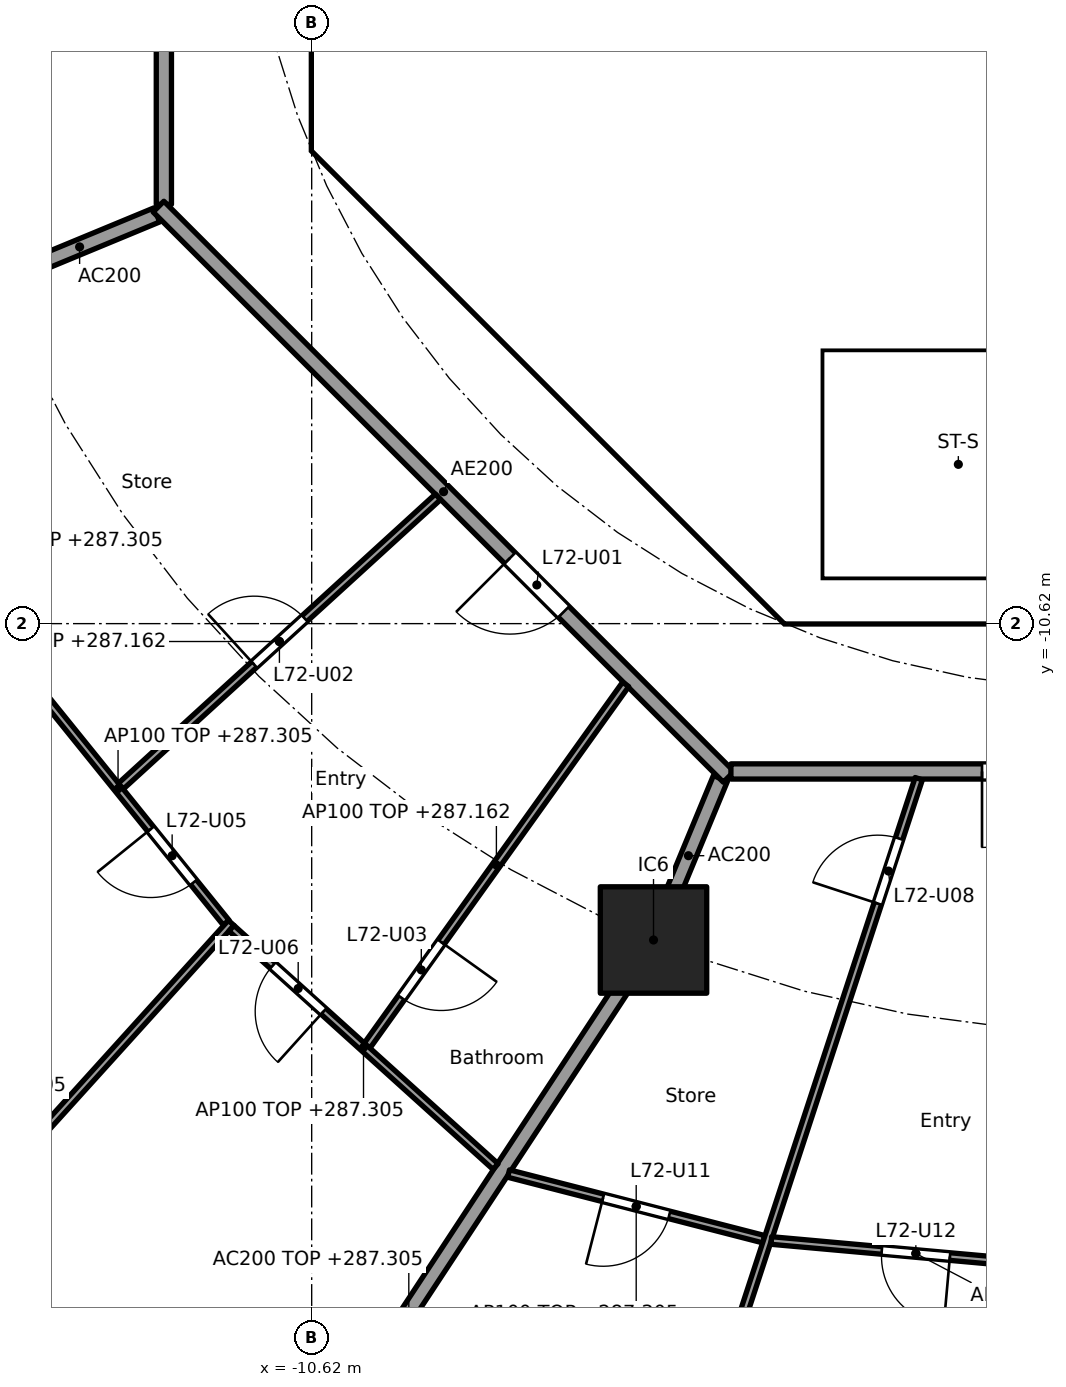
"""IFC4 building model, lengths in metres.
Left out: names, types, materials, properties, quantities, classifications, styles, units other than length and angle.
Written with IfcOpenShell. Run it as: python <this file> out.ifc"""

import sys

from ifc_helpers import new_model, si_unit, direction, frame, frame_2d, origin, origin_2d, place, context, subcontext, project, spatial, polyline, rectangle, outline, extrude, element, fill, save


model = new_model("IFC4")
c1 = context("Model", 3, precision=1e-05, world=origin(), true_north=direction((0.0, 1.0)))
c2 = subcontext(c1, "Body", "Model", "MODEL_VIEW")
j1 = project(units=[si_unit("LENGTHUNIT", "METRE"), si_unit("PLANEANGLEUNIT", "RADIAN")], contexts=[c1])
p1 = place(None, origin())
s1 = spatial("IfcSite", under=j1, at=p1, CompositionType="ELEMENT")
p2 = place(p1, origin())
s2 = spatial("IfcBuilding", under=s1, at=p2, CompositionType="ELEMENT")
p3 = place(p2, frame((0.0, 0.0, 284.4)))
s3 = spatial("IfcBuildingStorey", under=s2, at=p3, CompositionType="ELEMENT", Elevation=284.4)
p4 = place(p3, frame((-6.123, -14.782, 0.0), z_axis=(0.0, 0.0, 1.0), x_axis=(1.0, 0.0, 0.0)))
e1 = element("IfcColumn", 1, at=p4, inside=s3, PredefinedType="COLUMN", context=c2, shape_type="SweptSolid", body=[
    extrude(rectangle(XDim=1.4, YDim=1.4, at=origin_2d()), origin(), (0.0, 0.0, 1.0), 3.7),
])
p5 = place(p3, frame((-10.325, 3.801, 0.0), z_axis=(0.0, 0.0, 1.0), x_axis=(0.0, -1.0, 0.0)))
e2 = element("IfcWall", 2, at=p5, inside=s3, PredefinedType="SHEAR", context=c2, shape_type="SweptSolid", body=[
    extrude(rectangle(XDim=7.602, YDim=0.6, at=frame_2d((3.801, 0.0))), origin(), (0.0, 0.0, 1.0), 3.44),
])
p6 = place(p5, frame((0.651, 0.0, 0.0)))
e3 = element("IfcOpeningElement", 3, at=p6, cuts=e2, PredefinedType="OPENING", context=c2, shape_type="SweptSolid", body=[
    extrude(rectangle(XDim=1.5, YDim=2.1, at=frame_2d((0.75, 1.05))), frame((0.0, 0.31, 0.0), z_axis=(0.0, -1.0, 0.0), x_axis=(1.0, 0.0, 0.0)), (0.0, 0.0, 1.0), 0.62),
])
p7 = place(p5, frame((5.451, 0.0, 0.0)))
e4 = element("IfcOpeningElement", 4, at=p7, cuts=e2, PredefinedType="OPENING", context=c2, shape_type="SweptSolid", body=[
    extrude(rectangle(XDim=1.5, YDim=2.1, at=frame_2d((0.75, 1.05))), frame((0.0, 0.31, 0.0), z_axis=(0.0, -1.0, 0.0), x_axis=(1.0, 0.0, 0.0)), (0.0, 0.0, 1.0), 0.62),
])
p8 = place(p3, frame((-9.988, -4.613, 0.0), z_axis=(0.0, 0.0, 1.0), x_axis=(0.707106781187, -0.707106781187, 0.0)))
e5 = element("IfcWall", 5, at=p8, inside=s3, PredefinedType="SHEAR", context=c2, shape_type="SweptSolid", body=[
    extrude(rectangle(XDim=7.602, YDim=0.6, at=frame_2d((3.801, 0.0))), origin(), (0.0, 0.0, 1.0), 3.44),
])
p9 = place(p8, frame((6.151, 0.0, 0.0)))
e6 = element("IfcOpeningElement", 6, at=p9, cuts=e5, PredefinedType="OPENING", context=c2, shape_type="SweptSolid", body=[
    extrude(rectangle(XDim=1.1, YDim=2.1, at=frame_2d((0.55, 1.05))), frame((0.0, 0.31, 0.0), z_axis=(0.0, -1.0, 0.0), x_axis=(1.0, 0.0, 0.0)), (0.0, 0.0, 1.0), 0.62),
])
p10 = place(p3, frame((-6.2, -7.827, 0.0), z_axis=(0.0, 0.0, 1.0), x_axis=(0.0, 1.0, 0.0)))
e7 = element("IfcWall", 7, at=p10, inside=s3, PredefinedType="PARTITIONING", context=c2, shape_type="SweptSolid", body=[
    extrude(rectangle(XDim=3.527, YDim=0.15, at=frame_2d((1.763, 0.0))), origin(), (0.0, 0.0, 1.0), 3.44),
])
p11 = place(p10, frame((2.365, 0.0, 0.0)))
e8 = element("IfcOpeningElement", 8, at=p11, cuts=e7, PredefinedType="OPENING", context=c2, shape_type="SweptSolid", body=[
    extrude(rectangle(XDim=0.9, YDim=2.1, at=frame_2d((0.45, 1.05))), frame((0.0, 0.085, 0.0), z_axis=(0.0, -1.0, 0.0), x_axis=(1.0, 0.0, 0.0)), (0.0, 0.0, 1.0), 0.17),
])
p12 = place(p10, frame((0.489, 0.0, 0.0)))
e9 = element("IfcOpeningElement", 9, at=p12, cuts=e7, PredefinedType="OPENING", context=c2, shape_type="SweptSolid", body=[
    extrude(rectangle(XDim=0.9, YDim=2.1, at=frame_2d((0.45, 1.05))), frame((0.0, 0.085, 0.0), z_axis=(0.0, -1.0, 0.0), x_axis=(1.0, 0.0, 0.0)), (0.0, 0.0, 1.0), 0.17),
])
p13 = place(p3, frame((-4.0, -6.5, 0.0), z_axis=(0.0, 0.0, 1.0), x_axis=(0.0, 1.0, 0.0)))
e10 = element("IfcWall", 10, at=p13, inside=s3, PredefinedType="SOLIDWALL", context=c2, shape_type="SweptSolid", body=[
    extrude(rectangle(XDim=2.2, YDim=0.2, at=frame_2d((1.1, 0.0))), origin(), (0.0, 0.0, 1.0), 3.44),
])
p14 = place(p13, frame((0.65, 0.0, 0.0)))
e11 = element("IfcOpeningElement", 11, at=p14, cuts=e10, PredefinedType="OPENING", context=c2, shape_type="SweptSolid", body=[
    extrude(rectangle(XDim=0.9, YDim=2.1, at=frame_2d((0.45, 1.05))), frame((0.0, 0.11, 0.0), z_axis=(0.0, -1.0, 0.0), x_axis=(1.0, 0.0, 0.0)), (0.0, 0.0, 1.0), 0.22),
])
p15 = place(p3, origin())
e12 = element("IfcWall", 12, at=p15, inside=s3, PredefinedType="SHEAR", context=c2, shape_type="SweptSolid", body=[
    extrude(outline(polyline([(-10.625, -3.801), (-10.025, -3.801), (-10.025, -4.152), (-9.776, -4.401), (-10.2, -4.825), (-10.625, -4.401), (-10.625, -3.801)])), origin(), (0.0, 0.0, 1.0), 3.44),
])
p16 = place(p3, origin())
e13 = element("IfcWall", 13, at=p16, inside=s3, PredefinedType="SHEAR", context=c2, shape_type="SweptSolid", body=[
    extrude(outline(polyline([(-4.152, -10.025), (4.152, -10.025), (4.401, -9.776), (4.825, -10.2), (4.401, -10.625), (-4.401, -10.625), (-4.825, -10.2), (-4.401, -9.776), (-4.152, -10.025)])), origin(), (0.0, 0.0, 1.0), 3.44),
])
p17 = place(p3, frame((-10.025, -4.0, 0.0), z_axis=(0.0, 0.0, 1.0), x_axis=(1.0, 0.0, 0.0)))
e14 = element("IfcWall", 14, at=p17, inside=s3, PredefinedType="PARTITIONING", context=c2, shape_type="SweptSolid", body=[
    extrude(rectangle(XDim=3.325, YDim=0.2, at=frame_2d((1.662, 0.0))), origin(), (0.0, 0.0, 1.0), 3.44),
])
p18 = place(p3, frame((-8.301, -5.8, 0.0), z_axis=(0.0, 0.0, 1.0), x_axis=(1.0, 0.0, 0.0)))
e15 = element("IfcWall", 15, at=p18, inside=s3, PredefinedType="PARTITIONING", context=c2, shape_type="SweptSolid", body=[
    extrude(rectangle(XDim=2.026, YDim=0.15, at=frame_2d((1.013, 0.0))), origin(), (0.0, 0.0, 1.0), 3.44),
])
p19 = place(p3, origin())
e16 = element("IfcWall", 16, at=p19, inside=s3, PredefinedType="SOLIDWALL", context=c2, shape_type="SweptSolid", body=[
    extrude(outline(polyline([(-6.7, -2.1), (-6.5, -2.1), (-6.5, -4.1), (-2.3, -4.1), (-2.3, -2.1), (-2.1, -2.1), (-2.1, -4.1), (-0.1, -4.1), (-0.1, -2.1), (0.1, -2.1), (0.1, -4.1), (2.1, -4.1), (2.1, -2.1), (2.3, -2.1), (2.3, -4.1), (4.3, -4.1), (4.3, -2.1), (4.5, -2.1), (4.5, -4.1), (6.5, -4.1), (6.5, -2.1), (6.7, -2.1), (6.7, -4.3), (-6.7, -4.3), (-6.7, -2.1)])), origin(), (0.0, 0.0, 1.0), 3.44),
])
p20 = place(p3, origin())
e17 = element("IfcWall", 17, at=p20, inside=s3, PredefinedType="SOLIDWALL", context=c2, shape_type="SweptSolid", body=[
    extrude(outline(polyline([(-3.9, -10.025), (-4.1, -10.025), (-4.1, -7.025), (-3.9, -7.025), (-3.9, -10.025)])), origin(), (0.0, 0.0, 1.0), 3.44),
])
p21 = place(p3, origin())
e18 = element("IfcWall", 18, at=p21, inside=s3, PredefinedType="SOLIDWALL", context=c2, shape_type="SweptSolid", body=[
    extrude(outline(polyline([(4.1, -7.025), (-4.1, -7.025), (-4.1, -6.5), (4.1, -6.5), (4.1, -7.025)])), origin(), (0.0, 0.0, 1.0), 3.44),
])
p22 = place(p3, frame((-12.657, -5.243, 0.0), z_axis=(0.0, 0.0, 1.0), x_axis=(-0.923859888513, -0.38273085373, 0.0)))
e19 = element("IfcWall", 19, at=p22, inside=s3, PredefinedType="PARTITIONING", context=c2, shape_type="SweptSolid", body=[
    extrude(rectangle(XDim=2.199, YDim=0.2, at=frame_2d((1.1, 0.0))), origin(), (0.0, 0.0, 1.0), 3.44),
])
p23 = place(p3, frame((-5.243, -12.657, 0.0), z_axis=(0.0, 0.0, 1.0), x_axis=(-0.382770106157, -0.923843626288, 0.0)))
e20 = element("IfcWall", 20, at=p23, inside=s3, PredefinedType="PARTITIONING", context=c2, shape_type="SweptSolid", body=[
    extrude(rectangle(XDim=2.199, YDim=0.2, at=frame_2d((1.1, 0.0))), origin(), (0.0, 0.0, 1.0), 3.44),
])
p24 = place(p3, frame((-6.151, -14.824, 0.0), z_axis=(0.0, 0.0, 1.0), x_axis=(-0.549345577828, -0.835595258556, 0.0)))
e21 = element("IfcWall", 21, at=p24, inside=s3, PredefinedType="PARTITIONING", context=c2, shape_type="SweptSolid", body=[
    extrude(rectangle(XDim=11.62, YDim=0.2, at=frame_2d((5.81, 0.0))), origin(), (0.0, 0.0, 1.0), 2.905),
])
p25 = place(p3, frame((-12.565, 5.304, 0.0), z_axis=(0.0, 0.0, 1.0), x_axis=(0.0, -1.0, 0.0)))
e22 = element("IfcWall", 22, at=p25, inside=s3, PredefinedType="PARTITIONING", context=c2, shape_type="SweptSolid", body=[
    extrude(rectangle(XDim=10.409, YDim=0.2, at=frame_2d((5.205, 0.0))), origin(), (0.0, 0.0, 1.0), 3.44),
])
p26 = place(p25, frame((4.804, 0.0, 0.0)))
e23 = element("IfcOpeningElement", 23, at=p26, cuts=e22, PredefinedType="OPENING", context=c2, shape_type="SweptSolid", body=[
    extrude(rectangle(XDim=1.0, YDim=2.1, at=frame_2d((0.5, 1.05))), frame((0.0, 0.11, 0.0), z_axis=(0.0, -1.0, 0.0), x_axis=(1.0, 0.0, 0.0)), (0.0, 0.0, 1.0), 0.22),
])
p27 = place(p3, frame((-12.635, -5.134, 0.0), z_axis=(0.0, 0.0, 1.0), x_axis=(0.707106781187, -0.707106781187, 0.0)))
e24 = element("IfcWall", 24, at=p27, inside=s3, PredefinedType="PARTITIONING", context=c2, shape_type="SweptSolid", body=[
    extrude(rectangle(XDim=10.609, YDim=0.2, at=frame_2d((5.305, 0.0))), origin(), (0.0, 0.0, 1.0), 3.44),
])
p28 = place(p27, frame((6.539, 0.0, 0.0)))
e25 = element("IfcOpeningElement", 25, at=p28, cuts=e24, PredefinedType="OPENING", context=c2, shape_type="SweptSolid", body=[
    extrude(rectangle(XDim=1.0, YDim=2.1, at=frame_2d((0.5, 1.05))), frame((0.0, 0.11, 0.0), z_axis=(0.0, -1.0, 0.0), x_axis=(1.0, 0.0, 0.0)), (0.0, 0.0, 1.0), 0.22),
])
p29 = place(p3, frame((-5.104, -12.565, 0.0), z_axis=(0.0, 0.0, 1.0), x_axis=(1.0, 0.0, 0.0)))
e26 = element("IfcWall", 26, at=p29, inside=s3, PredefinedType="PARTITIONING", context=c2, shape_type="SweptSolid", body=[
    extrude(rectangle(XDim=10.409, YDim=0.2, at=frame_2d((5.205, 0.0))), origin(), (0.0, 0.0, 1.0), 3.44),
])
p30 = place(p29, frame((3.303, 0.0, 0.0)))
e27 = element("IfcOpeningElement", 27, at=p30, cuts=e26, PredefinedType="OPENING", context=c2, shape_type="SweptSolid", body=[
    extrude(rectangle(XDim=1.0, YDim=2.1, at=frame_2d((0.5, 1.05))), frame((0.0, 0.11, 0.0), z_axis=(0.0, -1.0, 0.0), x_axis=(1.0, 0.0, 0.0)), (0.0, 0.0, 1.0), 0.22),
])
p31 = place(p3, frame((-14.591, -11.029, 0.0), z_axis=(0.0, 0.0, 1.0), x_axis=(0.628170338674, -0.778075848237, 0.0)))
e28 = element("IfcWall", 28, at=p31, inside=s3, PredefinedType="PARTITIONING", context=c2, shape_type="SweptSolid", body=[
    extrude(rectangle(XDim=4.532, YDim=0.1, at=frame_2d((2.266, 0.0))), origin(), (0.0, 0.0, 1.0), 2.905),
])
p32 = place(p31, frame((2.949, 0.0, 0.0)))
e29 = element("IfcOpeningElement", 29, at=p32, cuts=e28, PredefinedType="OPENING", context=c2, shape_type="SweptSolid", body=[
    extrude(rectangle(XDim=0.9, YDim=2.1, at=frame_2d((0.45, 1.05))), frame((0.0, 0.06, 0.0), z_axis=(0.0, -1.0, 0.0), x_axis=(1.0, 0.0, 0.0)), (0.0, 0.0, 1.0), 0.12),
])
p33 = place(p3, frame((-8.958, -8.952, 0.0), z_axis=(0.0, 0.0, 1.0), x_axis=(-0.73876526954, -0.673962815385, 0.0)))
e30 = element("IfcWall", 30, at=p33, inside=s3, PredefinedType="PARTITIONING", context=c2, shape_type="SweptSolid", body=[
    extrude(rectangle(XDim=5.647, YDim=0.1, at=frame_2d((2.824, 0.0))), origin(), (0.0, 0.0, 1.0), 2.762),
])
p34 = place(p33, frame((2.374, 0.0, 0.0)))
e31 = element("IfcOpeningElement", 31, at=p34, cuts=e30, PredefinedType="OPENING", context=c2, shape_type="SweptSolid", body=[
    extrude(rectangle(XDim=0.9, YDim=2.1, at=frame_2d((0.45, 1.05))), frame((0.0, 0.06, 0.0), z_axis=(0.0, -1.0, 0.0), x_axis=(1.0, 0.0, 0.0)), (0.0, 0.0, 1.0), 0.12),
])
p35 = place(p3, frame((-11.679, -14.557, 0.0), z_axis=(0.0, 0.0, 1.0), x_axis=(-0.670800011545, -0.741638284146, 0.0)))
e32 = element("IfcWall", 32, at=p35, inside=s3, PredefinedType="PARTITIONING", context=c2, shape_type="SweptSolid", body=[
    extrude(rectangle(XDim=8.068, YDim=0.1, at=frame_2d((4.034, 0.0))), origin(), (0.0, 0.0, 1.0), 2.905),
])
p36 = place(p3, frame((-11.676, -14.628, 0.0), z_axis=(0.0, 0.0, 1.0), x_axis=(0.74245829867, -0.669892285921, 0.0)))
e33 = element("IfcWall", 33, at=p36, inside=s3, PredefinedType="PARTITIONING", context=c2, shape_type="SweptSolid", body=[
    extrude(rectangle(XDim=4.68, YDim=0.1, at=frame_2d((2.34, 0.0))), origin(), (0.0, 0.0, 1.0), 2.905),
])
p37 = place(p36, frame((0.732, 0.0, 0.0)))
e34 = element("IfcOpeningElement", 34, at=p37, cuts=e33, PredefinedType="OPENING", context=c2, shape_type="SweptSolid", body=[
    extrude(rectangle(XDim=0.9, YDim=2.1, at=frame_2d((0.45, 1.05))), frame((0.0, 0.06, 0.0), z_axis=(0.0, -1.0, 0.0), x_axis=(1.0, 0.0, 0.0)), (0.0, 0.0, 1.0), 0.12),
])
p38 = place(p3, frame((-6.49, -11.419, 0.0), z_axis=(0.0, 0.0, 1.0), x_axis=(-0.58201647594, -0.813176992871, 0.0)))
e35 = element("IfcWall", 35, at=p38, inside=s3, PredefinedType="PARTITIONING", context=c2, shape_type="SweptSolid", body=[
    extrude(rectangle(XDim=5.844, YDim=0.1, at=frame_2d((2.922, 0.0))), origin(), (0.0, 0.0, 1.0), 2.762),
])
p39 = place(p38, frame((4.169, 0.0, 0.0)))
e36 = element("IfcOpeningElement", 36, at=p39, cuts=e35, PredefinedType="OPENING", context=c2, shape_type="SweptSolid", body=[
    extrude(rectangle(XDim=0.9, YDim=2.1, at=frame_2d((0.45, 1.05))), frame((0.0, 0.06, 0.0), z_axis=(0.0, -1.0, 0.0), x_axis=(1.0, 0.0, 0.0)), (0.0, 0.0, 1.0), 0.12),
])
p40 = place(p3, frame((-8.03, -17.854, 0.0), z_axis=(0.0, 0.0, 1.0), x_axis=(0.968441967324, -0.249239154077, 0.0)))
e37 = element("IfcWall", 37, at=p40, inside=s3, PredefinedType="PARTITIONING", context=c2, shape_type="SweptSolid", body=[
    extrude(rectangle(XDim=3.468, YDim=0.1, at=frame_2d((1.734, 0.0))), origin(), (0.0, 0.0, 1.0), 2.905),
])
p41 = place(p40, frame((1.284, 0.0, 0.0)))
e38 = element("IfcOpeningElement", 38, at=p41, cuts=e37, PredefinedType="OPENING", context=c2, shape_type="SweptSolid", body=[
    extrude(rectangle(XDim=0.9, YDim=2.1, at=frame_2d((0.45, 1.05))), frame((0.0, 0.06, 0.0), z_axis=(0.0, -1.0, 0.0), x_axis=(1.0, 0.0, 0.0)), (0.0, 0.0, 1.0), 0.12),
])
p42 = place(p3, frame((-2.633, -12.66, 0.0), z_axis=(0.0, 0.0, 1.0), x_axis=(-0.311432955908, -0.950268127412, 0.0)))
e39 = element("IfcWall", 39, at=p42, inside=s3, PredefinedType="PARTITIONING", context=c2, shape_type="SweptSolid", body=[
    extrude(rectangle(XDim=15.074, YDim=0.1, at=frame_2d((7.537, 0.0))), origin(), (0.0, 0.0, 1.0), 2.762),
])
p43 = place(p42, frame((0.829, 0.0, 0.0)))
e40 = element("IfcOpeningElement", 40, at=p43, cuts=e39, PredefinedType="OPENING", context=c2, shape_type="SweptSolid", body=[
    extrude(rectangle(XDim=0.9, YDim=2.1, at=frame_2d((0.45, 1.05))), frame((0.0, 0.06, 0.0), z_axis=(0.0, -1.0, 0.0), x_axis=(1.0, 0.0, 0.0)), (0.0, 0.0, 1.0), 0.12),
])
p44 = place(p3, frame((-4.573, -18.736, 0.0), z_axis=(0.0, 0.0, 1.0), x_axis=(0.995986472869, -0.089503887414, 0.0)))
e41 = element("IfcWall", 41, at=p44, inside=s3, PredefinedType="PARTITIONING", context=c2, shape_type="SweptSolid", body=[
    extrude(rectangle(XDim=3.819, YDim=0.1, at=frame_2d((1.909, 0.0))), origin(), (0.0, 0.0, 1.0), 2.905),
])
p45 = place(p44, frame((1.459, 0.0, 0.0)))
e42 = element("IfcOpeningElement", 42, at=p45, cuts=e41, PredefinedType="OPENING", context=c2, shape_type="SweptSolid", body=[
    extrude(rectangle(XDim=0.9, YDim=2.1, at=frame_2d((0.45, 1.05))), frame((0.0, 0.06, 0.0), z_axis=(0.0, -1.0, 0.0), x_axis=(1.0, 0.0, 0.0)), (0.0, 0.0, 1.0), 0.12),
])
p46 = place(p11, origin())
e43 = element("IfcDoor", 43, at=p46, inside=s3, OperationType="SINGLE_SWING_LEFT", PredefinedType="DOOR", context=c2, shape_type="SweptSolid", body=[
    extrude(rectangle(XDim=0.9, YDim=2.1, at=frame_2d((0.45, 1.05))), frame((0.0, 0.025, 0.0), z_axis=(0.0, -1.0, 0.0), x_axis=(1.0, 0.0, 0.0)), (0.0, 0.0, 1.0), 0.05),
])
fill(e8, e43)
p47 = place(p12, origin())
e44 = element("IfcDoor", 44, at=p47, inside=s3, OperationType="SINGLE_SWING_LEFT", PredefinedType="DOOR", context=c2, shape_type="SweptSolid", body=[
    extrude(rectangle(XDim=0.9, YDim=2.1, at=frame_2d((0.45, 1.05))), frame((0.0, 0.025, 0.0), z_axis=(0.0, -1.0, 0.0), x_axis=(1.0, 0.0, 0.0)), (0.0, 0.0, 1.0), 0.05),
])
fill(e9, e44)
p48 = place(p14, frame((0.9, 0.0, 0.0), x_axis=(-1.0, 0.0, 0.0)))
e45 = element("IfcDoor", 45, at=p48, inside=s3, OperationType="SINGLE_SWING_LEFT", PredefinedType="DOOR", context=c2, shape_type="SweptSolid", body=[
    extrude(rectangle(XDim=0.9, YDim=2.1, at=frame_2d((0.45, 1.05))), frame((0.0, 0.025, 0.0), z_axis=(0.0, -1.0, 0.0), x_axis=(1.0, 0.0, 0.0)), (0.0, 0.0, 1.0), 0.05),
])
fill(e11, e45)
p49 = place(p7, origin())
e46 = element("IfcDoor", 46, at=p49, inside=s3, OperationType="DOUBLE_DOOR_SINGLE_SWING", PredefinedType="DOOR", context=c2, shape_type="SweptSolid", body=[
    extrude(rectangle(XDim=1.5, YDim=2.1, at=frame_2d((0.75, 1.05))), frame((0.0, 0.025, 0.0), z_axis=(0.0, -1.0, 0.0), x_axis=(1.0, 0.0, 0.0)), (0.0, 0.0, 1.0), 0.05),
])
fill(e4, e46)
p50 = place(p9, origin())
e47 = element("IfcDoor", 47, at=p50, inside=s3, OperationType="SINGLE_SWING_LEFT", PredefinedType="DOOR", context=c2, shape_type="SweptSolid", body=[
    extrude(rectangle(XDim=1.1, YDim=2.1, at=frame_2d((0.55, 1.05))), frame((0.0, 0.025, 0.0), z_axis=(0.0, -1.0, 0.0), x_axis=(1.0, 0.0, 0.0)), (0.0, 0.0, 1.0), 0.05),
])
fill(e6, e47)
p51 = place(p28, frame((1.0, 0.0, 0.0), x_axis=(-1.0, 0.0, 0.0)))
e48 = element("IfcDoor", 48, at=p51, inside=s3, OperationType="SINGLE_SWING_RIGHT", PredefinedType="DOOR", context=c2, shape_type="SweptSolid", body=[
    extrude(rectangle(XDim=1.0, YDim=2.1, at=frame_2d((0.5, 1.05))), frame((0.0, 0.025, 0.0), z_axis=(0.0, -1.0, 0.0), x_axis=(1.0, 0.0, 0.0)), (0.0, 0.0, 1.0), 0.05),
])
fill(e25, e48)
p52 = place(p34, frame((0.9, 0.0, 0.0), x_axis=(-1.0, 0.0, 0.0)))
e49 = element("IfcDoor", 49, at=p52, inside=s3, OperationType="SINGLE_SWING_LEFT", PredefinedType="DOOR", context=c2, shape_type="SweptSolid", body=[
    extrude(rectangle(XDim=0.9, YDim=2.1, at=frame_2d((0.45, 1.05))), frame((0.0, 0.025, 0.0), z_axis=(0.0, -1.0, 0.0), x_axis=(1.0, 0.0, 0.0)), (0.0, 0.0, 1.0), 0.05),
])
fill(e31, e49)
p53 = place(p39, origin())
e50 = element("IfcDoor", 50, at=p53, inside=s3, OperationType="SINGLE_SWING_LEFT", PredefinedType="DOOR", context=c2, shape_type="SweptSolid", body=[
    extrude(rectangle(XDim=0.9, YDim=2.1, at=frame_2d((0.45, 1.05))), frame((0.0, 0.025, 0.0), z_axis=(0.0, -1.0, 0.0), x_axis=(1.0, 0.0, 0.0)), (0.0, 0.0, 1.0), 0.05),
])
fill(e36, e50)
p54 = place(p32, frame((0.9, 0.0, 0.0), x_axis=(-1.0, 0.0, 0.0)))
e51 = element("IfcDoor", 51, at=p54, inside=s3, OperationType="SINGLE_SWING_RIGHT", PredefinedType="DOOR", context=c2, shape_type="SweptSolid", body=[
    extrude(rectangle(XDim=0.9, YDim=2.1, at=frame_2d((0.45, 1.05))), frame((0.0, 0.025, 0.0), z_axis=(0.0, -1.0, 0.0), x_axis=(1.0, 0.0, 0.0)), (0.0, 0.0, 1.0), 0.05),
])
fill(e29, e51)
p55 = place(p37, frame((0.9, 0.0, 0.0), x_axis=(-1.0, 0.0, 0.0)))
e52 = element("IfcDoor", 52, at=p55, inside=s3, OperationType="SINGLE_SWING_LEFT", PredefinedType="DOOR", context=c2, shape_type="SweptSolid", body=[
    extrude(rectangle(XDim=0.9, YDim=2.1, at=frame_2d((0.45, 1.05))), frame((0.0, 0.025, 0.0), z_axis=(0.0, -1.0, 0.0), x_axis=(1.0, 0.0, 0.0)), (0.0, 0.0, 1.0), 0.05),
])
fill(e34, e52)
p56 = place(p30, frame((1.0, 0.0, 0.0), x_axis=(-1.0, 0.0, 0.0)))
e53 = element("IfcDoor", 53, at=p56, inside=s3, OperationType="SINGLE_SWING_RIGHT", PredefinedType="DOOR", context=c2, shape_type="SweptSolid", body=[
    extrude(rectangle(XDim=1.0, YDim=2.1, at=frame_2d((0.5, 1.05))), frame((0.0, 0.025, 0.0), z_axis=(0.0, -1.0, 0.0), x_axis=(1.0, 0.0, 0.0)), (0.0, 0.0, 1.0), 0.05),
])
fill(e27, e53)
p57 = place(p43, frame((0.9, 0.0, 0.0), x_axis=(-1.0, 0.0, 0.0)))
e54 = element("IfcDoor", 54, at=p57, inside=s3, OperationType="SINGLE_SWING_LEFT", PredefinedType="DOOR", context=c2, shape_type="SweptSolid", body=[
    extrude(rectangle(XDim=0.9, YDim=2.1, at=frame_2d((0.45, 1.05))), frame((0.0, 0.025, 0.0), z_axis=(0.0, -1.0, 0.0), x_axis=(1.0, 0.0, 0.0)), (0.0, 0.0, 1.0), 0.05),
])
fill(e40, e54)
p58 = place(p41, frame((0.9, 0.0, 0.0), x_axis=(-1.0, 0.0, 0.0)))
e55 = element("IfcDoor", 55, at=p58, inside=s3, OperationType="SINGLE_SWING_RIGHT", PredefinedType="DOOR", context=c2, shape_type="SweptSolid", body=[
    extrude(rectangle(XDim=0.9, YDim=2.1, at=frame_2d((0.45, 1.05))), frame((0.0, 0.025, 0.0), z_axis=(0.0, -1.0, 0.0), x_axis=(1.0, 0.0, 0.0)), (0.0, 0.0, 1.0), 0.05),
])
fill(e38, e55)
p59 = place(p45, frame((0.9, 0.0, 0.0), x_axis=(-1.0, 0.0, 0.0)))
e56 = element("IfcDoor", 56, at=p59, inside=s3, OperationType="SINGLE_SWING_LEFT", PredefinedType="DOOR", context=c2, shape_type="SweptSolid", body=[
    extrude(rectangle(XDim=0.9, YDim=2.1, at=frame_2d((0.45, 1.05))), frame((0.0, 0.025, 0.0), z_axis=(0.0, -1.0, 0.0), x_axis=(1.0, 0.0, 0.0)), (0.0, 0.0, 1.0), 0.05),
])
fill(e42, e56)
save(model, sys.argv[1])
